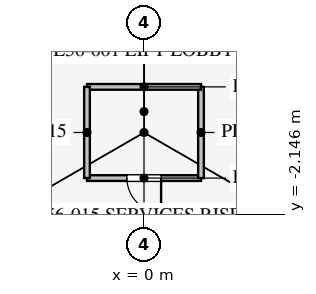
"""IFC4 building model, lengths in metres.
Left out: names, types, materials, properties, quantities, classifications, styles, units other than length and angle.
Written with IfcOpenShell. Run it as: python <this file> out.ifc"""

import sys

from ifc_helpers import new_model, si_unit, direction, frame, frame_2d, origin, place, context, subcontext, project, spatial, rectangle, extrude, element, fill, save


model = new_model("IFC4")
c1 = context("Model", 3, precision=1e-05, world=origin(), true_north=direction((0.0, 1.0)))
c2 = subcontext(c1, "Body", "Model", "MODEL_VIEW")
j1 = project(units=[si_unit("LENGTHUNIT", "METRE"), si_unit("PLANEANGLEUNIT", "RADIAN")], contexts=[c1])
p1 = place(None, origin())
s1 = spatial("IfcSite", under=j1, at=p1, CompositionType="ELEMENT")
p2 = place(p1, origin())
s2 = spatial("IfcBuilding", under=s1, at=p2, CompositionType="ELEMENT")
p3 = place(p2, frame((0.0, 0.0, 244.3)))
s3 = spatial("IfcBuildingStorey", under=s2, at=p3, CompositionType="ELEMENT", Elevation=244.3)
p4 = place(p3, frame((-1.5, -1.2, 0.0), z_axis=(0.0, 0.0, 1.0), x_axis=(1.0, 0.0, 0.0)))
e1 = element("IfcWall", 1, at=p4, inside=s3, PredefinedType="PARTITIONING", context=c2, shape_type="SweptSolid", body=[
    extrude(rectangle(XDim=3.0, YDim=0.15, at=frame_2d((1.5, 0.0))), origin(), (0.0, 0.0, 1.0), 4.0),
])
p5 = place(p4, frame((1.05, 0.0, 0.0)))
e2 = element("IfcOpeningElement", 2, at=p5, cuts=e1, PredefinedType="OPENING", context=c2, shape_type="SweptSolid", body=[
    extrude(rectangle(XDim=0.9, YDim=2.1, at=frame_2d((0.45, 1.05))), frame((0.0, 0.085, 0.0), z_axis=(0.0, -1.0, 0.0), x_axis=(1.0, 0.0, 0.0)), (0.0, 0.0, 1.0), 0.17),
])
p6 = place(p3, frame((1.5, -1.2, 0.0), z_axis=(0.0, 0.0, 1.0), x_axis=(0.0, 1.0, 0.0)))
e3 = element("IfcWall", 3, at=p6, inside=s3, PredefinedType="PARTITIONING", context=c2, shape_type="SweptSolid", body=[
    extrude(rectangle(XDim=2.4, YDim=0.15, at=frame_2d((1.2, 0.0))), origin(), (0.0, 0.0, 1.0), 4.0),
])
p7 = place(p3, frame((1.5, 1.2, 0.0), z_axis=(0.0, 0.0, 1.0), x_axis=(-1.0, 0.0, 0.0)))
e4 = element("IfcWall", 4, at=p7, inside=s3, PredefinedType="PARTITIONING", context=c2, shape_type="SweptSolid", body=[
    extrude(rectangle(XDim=3.0, YDim=0.15, at=frame_2d((1.5, 0.0))), origin(), (0.0, 0.0, 1.0), 4.0),
])
p8 = place(p3, frame((-1.5, 1.2, 0.0), z_axis=(0.0, 0.0, 1.0), x_axis=(0.0, -1.0, 0.0)))
e5 = element("IfcWall", 5, at=p8, inside=s3, PredefinedType="PARTITIONING", context=c2, shape_type="SweptSolid", body=[
    extrude(rectangle(XDim=2.4, YDim=0.15, at=frame_2d((1.2, 0.0))), origin(), (0.0, 0.0, 1.0), 4.0),
])
p9 = place(p5, frame((0.9, 0.0, 0.0), z_axis=(0.0, 0.0, 1.0), x_axis=(-1.0, 0.0, 0.0)))
e6 = element("IfcDoor", 6, at=p9, inside=s3, OperationType="SINGLE_SWING_LEFT", PredefinedType="DOOR", context=c2, shape_type="SweptSolid", body=[
    extrude(rectangle(XDim=0.9, YDim=2.1, at=frame_2d((0.45, 1.05))), frame((0.0, 0.025, 0.0), z_axis=(0.0, -1.0, 0.0), x_axis=(1.0, 0.0, 0.0)), (0.0, 0.0, 1.0), 0.05),
])
fill(e2, e6)
save(model, sys.argv[1])
